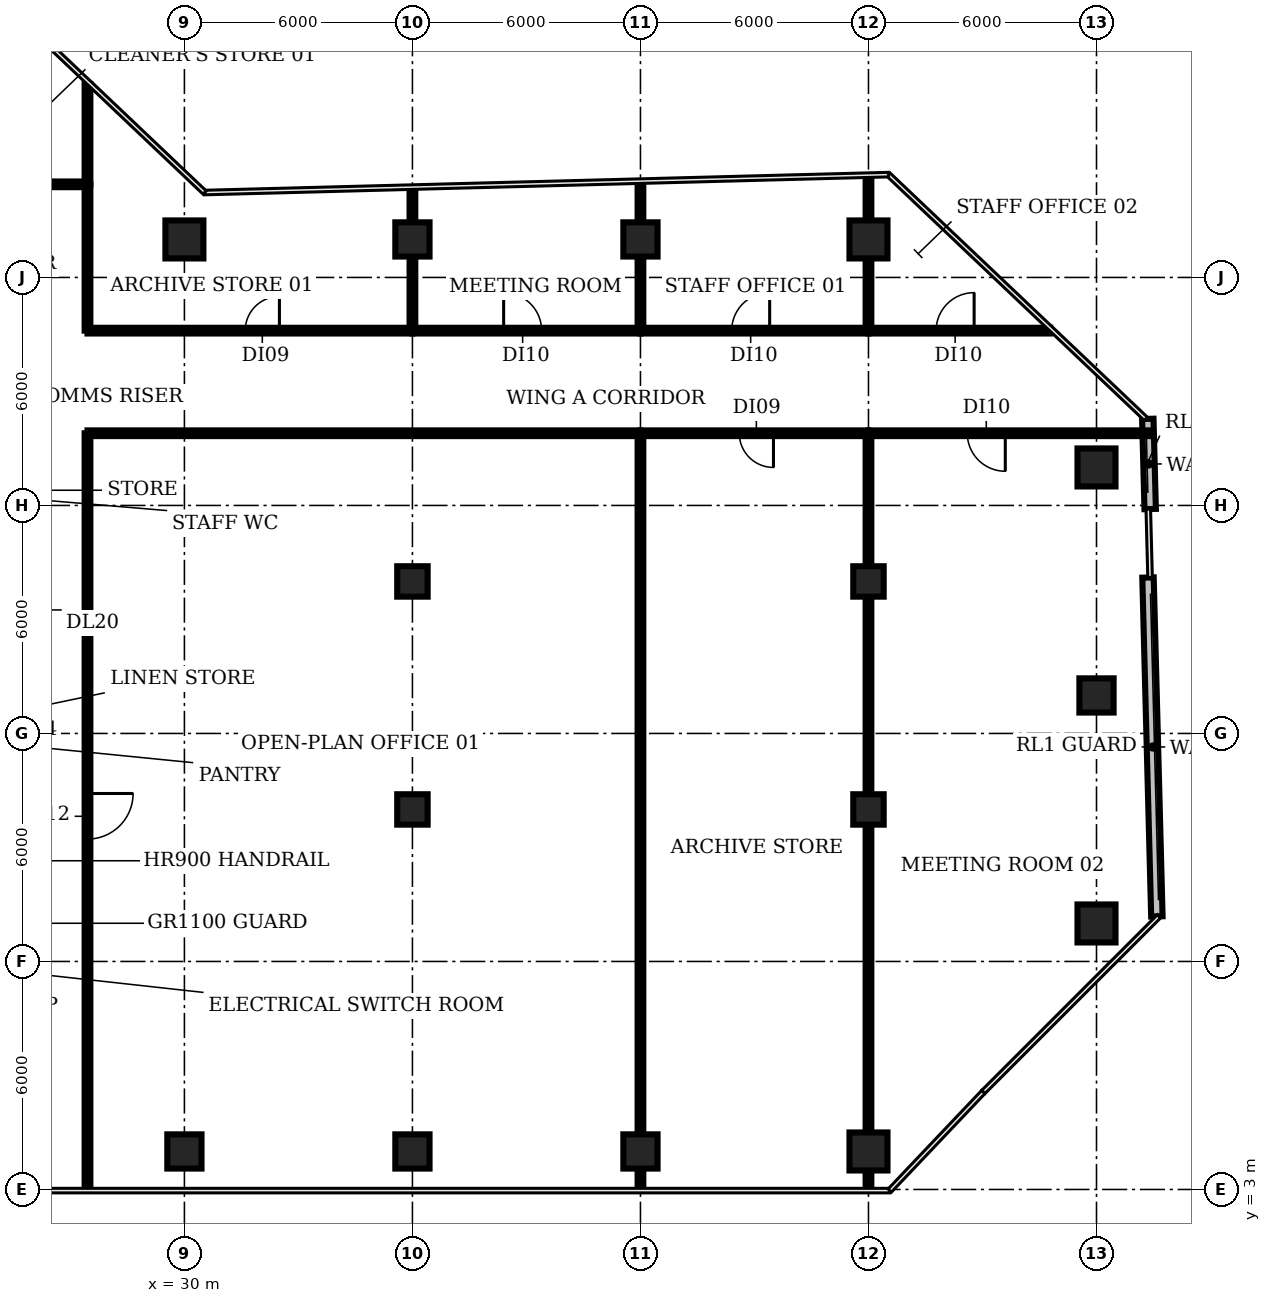
"""IFC4 building model, lengths in metres.
Left out: names, types, materials, properties, quantities, classifications, styles, units other than length and angle.
Written with IfcOpenShell. Run it as: python <this file> out.ifc"""

import sys

from ifc_helpers import new_model, si_unit, direction, frame, frame_2d, origin, origin_2d, place, context, subcontext, project, spatial, rectangle, circle, extrude, element, fill, save


model = new_model("IFC4")
c1 = context("Model", 3, precision=1e-05, world=origin(), true_north=direction((0.0, 1.0)))
c2 = subcontext(c1, "Body", "Model", "MODEL_VIEW")
j1 = project(units=[si_unit("LENGTHUNIT", "METRE"), si_unit("PLANEANGLEUNIT", "RADIAN")], contexts=[c1])
p1 = place(None, origin())
s1 = spatial("IfcSite", under=j1, at=p1, CompositionType="ELEMENT")
p2 = place(p1, origin())
s2 = spatial("IfcBuilding", under=s1, at=p2, CompositionType="ELEMENT")
p3 = place(p2, frame((0.0, 0.0, 104.6)))
s3 = spatial("IfcBuildingStorey", under=s2, at=p3, CompositionType="ELEMENT", Elevation=104.6)
p4 = place(p3, frame((30.0, 4.0, 0.0), z_axis=(0.0, 0.0, 1.0), x_axis=(1.0, 0.0, 0.0)))
e1 = element("IfcColumn", 1, at=p4, inside=s3, PredefinedType="COLUMN", context=c2, shape_type="SweptSolid", body=[
    extrude(rectangle(XDim=0.9, YDim=0.9, at=origin_2d()), origin(), (0.0, 0.0, 1.0), 3.85),
])
p5 = place(p3, frame((30.0, 28.0, 0.0), z_axis=(0.0, 0.0, 1.0), x_axis=(1.0, 0.0, 0.0)))
e2 = element("IfcColumn", 2, at=p5, inside=s3, PredefinedType="COLUMN", context=c2, shape_type="SweptSolid", body=[
    extrude(circle(Radius=0.5, at=origin_2d()), origin(), (0.0, 0.0, 1.0), 3.85),
])
p6 = place(p3, frame((36.0, 4.0, 0.0), z_axis=(0.0, 0.0, 1.0), x_axis=(1.0, 0.0, 0.0)))
e3 = element("IfcColumn", 3, at=p6, inside=s3, PredefinedType="COLUMN", context=c2, shape_type="SweptSolid", body=[
    extrude(rectangle(XDim=0.9, YDim=0.9, at=origin_2d()), origin(), (0.0, 0.0, 1.0), 3.85),
])
for number, where, z_axis, x_axis in (
    (4, (36.0, 13.0, 0.0), (0.0, 0.0, 1.0), (1.0, 0.0, 0.0)),
    (5, (36.0, 19.0, 0.0), (0.0, 0.0, 1.0), (1.0, 0.0, 0.0)),
):
    element("IfcColumn", number, at=place(p3, frame(where, z_axis=z_axis, x_axis=x_axis)), inside=s3, PredefinedType="COLUMN", context=c2, shape_type="SweptSolid", body=[
        extrude(rectangle(XDim=0.8, YDim=0.8, at=origin_2d()), origin(), (0.0, 0.0, 1.0), 3.85),
    ])
for number, where, z_axis, x_axis in (
    (6, (36.0, 28.0, 0.0), (0.0, 0.0, 1.0), (1.0, 0.0, 0.0)),
    (7, (42.0, 4.0, 0.0), (0.0, 0.0, 1.0), (1.0, 0.0, 0.0)),
    (8, (42.0, 28.0, 0.0), (0.0, 0.0, 1.0), (1.0, 0.0, 0.0)),
):
    element("IfcColumn", number, at=place(p3, frame(where, z_axis=z_axis, x_axis=x_axis)), inside=s3, PredefinedType="COLUMN", context=c2, shape_type="SweptSolid", body=[
        extrude(rectangle(XDim=0.9, YDim=0.9, at=origin_2d()), origin(), (0.0, 0.0, 1.0), 3.85),
    ])
p7 = place(p3, frame((48.0, 4.0, 0.0), z_axis=(0.0, 0.0, 1.0), x_axis=(1.0, 0.0, 0.0)))
e9 = element("IfcColumn", 9, at=p7, inside=s3, PredefinedType="COLUMN", context=c2, shape_type="SweptSolid", body=[
    extrude(circle(Radius=0.5, at=origin_2d()), origin(), (0.0, 0.0, 1.0), 3.85),
])
for number, where, z_axis, x_axis in (
    (10, (48.0, 13.0, 0.0), (0.0, 0.0, 1.0), (1.0, 0.0, 0.0)),
    (11, (48.0, 19.0, 0.0), (0.0, 0.0, 1.0), (1.0, 0.0, 0.0)),
):
    element("IfcColumn", number, at=place(p3, frame(where, z_axis=z_axis, x_axis=x_axis)), inside=s3, PredefinedType="COLUMN", context=c2, shape_type="SweptSolid", body=[
        extrude(rectangle(XDim=0.8, YDim=0.8, at=origin_2d()), origin(), (0.0, 0.0, 1.0), 3.85),
    ])
for number, where, z_axis, x_axis in (
    (12, (48.0, 28.0, 0.0), (0.0, 0.0, 1.0), (1.0, 0.0, 0.0)),
    (13, (54.0, 10.0, 0.0), (0.0, 0.0, 1.0), (1.0, 0.0, 0.0)),
):
    element("IfcColumn", number, at=place(p3, frame(where, z_axis=z_axis, x_axis=x_axis)), inside=s3, PredefinedType="COLUMN", context=c2, shape_type="SweptSolid", body=[
        extrude(circle(Radius=0.5, at=origin_2d()), origin(), (0.0, 0.0, 1.0), 3.85),
    ])
p8 = place(p3, frame((54.0, 16.0, 0.0), z_axis=(0.0, 0.0, 1.0), x_axis=(1.0, 0.0, 0.0)))
e14 = element("IfcColumn", 14, at=p8, inside=s3, PredefinedType="COLUMN", context=c2, shape_type="SweptSolid", body=[
    extrude(rectangle(XDim=0.9, YDim=0.9, at=origin_2d()), origin(), (0.0, 0.0, 1.0), 3.85),
])
p9 = place(p3, frame((54.0, 22.0, 0.0), z_axis=(0.0, 0.0, 1.0), x_axis=(1.0, 0.0, 0.0)))
e15 = element("IfcColumn", 15, at=p9, inside=s3, PredefinedType="COLUMN", context=c2, shape_type="SweptSolid", body=[
    extrude(circle(Radius=0.5, at=origin_2d()), origin(), (0.0, 0.0, 1.0), 3.85),
])
p10 = place(p3, frame((55.589, 10.185, 0.0), z_axis=(0.0, 0.0, 1.0), x_axis=(-0.026188660455, 0.999657018214, 0.0)))
e16 = element("IfcWall", 16, at=p10, inside=s3, PredefinedType="SOLIDWALL", context=c2, shape_type="SweptSolid", body=[
    extrude(rectangle(XDim=8.922, YDim=0.3, at=frame_2d((4.461, 0.0))), origin(), (0.0, 0.0, 1.0), 3.85),
])
p11 = place(p3, frame((55.412, 20.906, 0.0), z_axis=(0.0, 0.0, 1.0), x_axis=(-0.026122769601, 0.999658742226, 0.0)))
e17 = element("IfcWall", 17, at=p11, inside=s3, PredefinedType="SOLIDWALL", context=c2, shape_type="SweptSolid", body=[
    extrude(rectangle(XDim=2.374, YDim=0.3, at=frame_2d((1.187, 0.0))), origin(), (0.0, 0.0, 1.0), 3.85),
])
p12 = place(p3, frame((23.85, 29.45, 0.0), z_axis=(0.0, 0.0, 1.0), x_axis=(1.0, 0.0, 0.0)))
e18 = element("IfcWall", 18, at=p12, inside=s3, PredefinedType="PARTITIONING", context=c2, shape_type="SweptSolid", body=[
    extrude(rectangle(XDim=3.6, YDim=0.15, at=frame_2d((1.8, 0.0))), origin(), (0.0, 0.0, 1.0), 2.83),
])
p13 = place(p12, frame((1.3, 0.0, 0.0)))
e19 = element("IfcOpeningElement", 19, at=p13, cuts=e18, PredefinedType="OPENING", context=c2, shape_type="SweptSolid", body=[
    extrude(rectangle(XDim=0.9, YDim=2.1, at=frame_2d((0.45, 1.05))), frame((0.0, 0.085, 0.0), z_axis=(0.0, -1.0, 0.0), x_axis=(1.0, 0.0, 0.0)), (0.0, 0.0, 1.0), 0.17),
])
p14 = place(p3, frame((27.45, 22.9, 0.0), z_axis=(0.0, 0.0, 1.0), x_axis=(0.0, -1.0, 0.0)))
e20 = element("IfcWall", 20, at=p14, inside=s3, PredefinedType="PARTITIONING", context=c2, shape_type="SweptSolid", body=[
    extrude(rectangle(XDim=19.88, YDim=0.15, at=frame_2d((9.94, 0.0))), origin(), (0.0, 0.0, 1.0), 2.83),
])
p15 = place(p14, frame((9.48, 0.0, 0.0)))
e21 = element("IfcOpeningElement", 21, at=p15, cuts=e20, PredefinedType="OPENING", context=c2, shape_type="SweptSolid", body=[
    extrude(rectangle(XDim=1.2, YDim=2.1, at=frame_2d((0.6, 1.05))), frame((0.0, 0.085, 0.0), z_axis=(0.0, -1.0, 0.0), x_axis=(1.0, 0.0, 0.0)), (0.0, 0.0, 1.0), 0.17),
])
p16 = place(p3, frame((27.45, 22.9, 0.0), z_axis=(0.0, 0.0, 1.0), x_axis=(1.0, 0.0, 0.0)))
e22 = element("IfcWall", 22, at=p16, inside=s3, PredefinedType="PARTITIONING", context=c2, shape_type="SweptSolid", body=[
    extrude(rectangle(XDim=14.55, YDim=0.15, at=frame_2d((7.275, 0.0))), origin(), (0.0, 0.0, 1.0), 2.83),
])
p17 = place(p3, frame((27.45, 25.6, 0.0), z_axis=(0.0, 0.0, 1.0), x_axis=(0.0, 1.0, 0.0)))
e23 = element("IfcWall", 23, at=p17, inside=s3, PredefinedType="PARTITIONING", context=c2, shape_type="SweptSolid", body=[
    extrude(rectangle(XDim=3.85, YDim=0.15, at=frame_2d((1.925, 0.0))), origin(), (0.0, 0.0, 1.0), 2.83),
])
p18 = place(p3, frame((27.45, 25.6, 0.0), z_axis=(0.0, 0.0, 1.0), x_axis=(1.0, 0.0, 0.0)))
e24 = element("IfcWall", 24, at=p18, inside=s3, PredefinedType="PARTITIONING", context=c2, shape_type="SweptSolid", body=[
    extrude(rectangle(XDim=8.55, YDim=0.15, at=frame_2d((4.275, 0.0))), origin(), (0.0, 0.0, 1.0), 2.83),
])
p19 = place(p18, frame((4.15, 0.0, 0.0)))
e25 = element("IfcOpeningElement", 25, at=p19, cuts=e24, PredefinedType="OPENING", context=c2, shape_type="SweptSolid", body=[
    extrude(rectangle(XDim=0.9, YDim=2.1, at=frame_2d((0.45, 1.05))), frame((0.0, 0.085, 0.0), z_axis=(0.0, -1.0, 0.0), x_axis=(1.0, 0.0, 0.0)), (0.0, 0.0, 1.0), 0.17),
])
p20 = place(p3, frame((27.45, 29.45, 0.0), z_axis=(0.0, 0.0, 1.0), x_axis=(0.0, 1.0, 0.0)))
e26 = element("IfcWall", 26, at=p20, inside=s3, PredefinedType="PARTITIONING", context=c2, shape_type="SweptSolid", body=[
    extrude(rectangle(XDim=2.64, YDim=0.15, at=frame_2d((1.32, 0.0))), origin(), (0.0, 0.0, 1.0), 2.83),
])
p21 = place(p3, frame((36.0, 25.6, 0.0), z_axis=(0.0, 0.0, 1.0), x_axis=(0.0, 1.0, 0.0)))
e27 = element("IfcWall", 27, at=p21, inside=s3, PredefinedType="PARTITIONING", context=c2, shape_type="SweptSolid", body=[
    extrude(rectangle(XDim=3.73, YDim=0.15, at=frame_2d((1.865, 0.0))), origin(), (0.0, 0.0, 1.0), 2.83),
])
p22 = place(p3, frame((36.0, 25.6, 0.0), z_axis=(0.0, 0.0, 1.0), x_axis=(1.0, 0.0, 0.0)))
e28 = element("IfcWall", 28, at=p22, inside=s3, PredefinedType="PARTITIONING", context=c2, shape_type="SweptSolid", body=[
    extrude(rectangle(XDim=6.0, YDim=0.15, at=frame_2d((3.0, 0.0))), origin(), (0.0, 0.0, 1.0), 2.83),
])
p23 = place(p22, frame((2.4, 0.0, 0.0)))
e29 = element("IfcOpeningElement", 29, at=p23, cuts=e28, PredefinedType="OPENING", context=c2, shape_type="SweptSolid", body=[
    extrude(rectangle(XDim=1.0, YDim=2.1, at=frame_2d((0.5, 1.05))), frame((0.0, 0.085, 0.0), z_axis=(0.0, -1.0, 0.0), x_axis=(1.0, 0.0, 0.0)), (0.0, 0.0, 1.0), 0.17),
])
p24 = place(p3, frame((42.0, 3.02, 0.0), z_axis=(0.0, 0.0, 1.0), x_axis=(0.0, 1.0, 0.0)))
e30 = element("IfcWall", 30, at=p24, inside=s3, PredefinedType="PARTITIONING", context=c2, shape_type="SweptSolid", body=[
    extrude(rectangle(XDim=19.88, YDim=0.15, at=frame_2d((9.94, 0.0))), origin(), (0.0, 0.0, 1.0), 2.83),
])
p25 = place(p3, frame((42.0, 25.6, 0.0), z_axis=(0.0, 0.0, 1.0), x_axis=(0.0, 1.0, 0.0)))
e31 = element("IfcWall", 31, at=p25, inside=s3, PredefinedType="PARTITIONING", context=c2, shape_type="SweptSolid", body=[
    extrude(rectangle(XDim=3.88, YDim=0.15, at=frame_2d((1.94, 0.0))), origin(), (0.0, 0.0, 1.0), 2.83),
])
p26 = place(p3, frame((42.0, 25.6, 0.0), z_axis=(0.0, 0.0, 1.0), x_axis=(1.0, 0.0, 0.0)))
e32 = element("IfcWall", 32, at=p26, inside=s3, PredefinedType="PARTITIONING", context=c2, shape_type="SweptSolid", body=[
    extrude(rectangle(XDim=6.0, YDim=0.15, at=frame_2d((3.0, 0.0))), origin(), (0.0, 0.0, 1.0), 2.83),
])
p27 = place(p26, frame((2.4, 0.0, 0.0)))
e33 = element("IfcOpeningElement", 33, at=p27, cuts=e32, PredefinedType="OPENING", context=c2, shape_type="SweptSolid", body=[
    extrude(rectangle(XDim=1.0, YDim=2.1, at=frame_2d((0.5, 1.05))), frame((0.0, 0.085, 0.0), z_axis=(0.0, -1.0, 0.0), x_axis=(1.0, 0.0, 0.0)), (0.0, 0.0, 1.0), 0.17),
])
p28 = place(p3, frame((48.0, 3.02, 0.0), z_axis=(0.0, 0.0, 1.0), x_axis=(0.0, 1.0, 0.0)))
e34 = element("IfcWall", 34, at=p28, inside=s3, PredefinedType="PARTITIONING", context=c2, shape_type="SweptSolid", body=[
    extrude(rectangle(XDim=19.88, YDim=0.15, at=frame_2d((9.94, 0.0))), origin(), (0.0, 0.0, 1.0), 2.83),
])
p29 = place(p3, frame((48.0, 22.9, 0.0), z_axis=(0.0, 0.0, 1.0), x_axis=(-1.0, 0.0, 0.0)))
e35 = element("IfcWall", 35, at=p29, inside=s3, PredefinedType="PARTITIONING", context=c2, shape_type="SweptSolid", body=[
    extrude(rectangle(XDim=6.0, YDim=0.15, at=frame_2d((3.0, 0.0))), origin(), (0.0, 0.0, 1.0), 2.83),
])
p30 = place(p29, frame((2.5, 0.0, 0.0)))
e36 = element("IfcOpeningElement", 36, at=p30, cuts=e35, PredefinedType="OPENING", context=c2, shape_type="SweptSolid", body=[
    extrude(rectangle(XDim=0.9, YDim=2.1, at=frame_2d((0.45, 1.05))), frame((0.0, 0.085, 0.0), z_axis=(0.0, -1.0, 0.0), x_axis=(1.0, 0.0, 0.0)), (0.0, 0.0, 1.0), 0.17),
])
p31 = place(p3, frame((48.0, 25.6, 0.0), z_axis=(0.0, 0.0, 1.0), x_axis=(0.0, 1.0, 0.0)))
e37 = element("IfcWall", 37, at=p31, inside=s3, PredefinedType="PARTITIONING", context=c2, shape_type="SweptSolid", body=[
    extrude(rectangle(XDim=4.04, YDim=0.15, at=frame_2d((2.02, 0.0))), origin(), (0.0, 0.0, 1.0), 2.83),
])
p32 = place(p3, frame((48.0, 25.6, 0.0), z_axis=(0.0, 0.0, 1.0), x_axis=(1.0, 0.0, 0.0)))
e38 = element("IfcWall", 38, at=p32, inside=s3, PredefinedType="PARTITIONING", context=c2, shape_type="SweptSolid", body=[
    extrude(rectangle(XDim=4.78, YDim=0.15, at=frame_2d((2.39, 0.0))), origin(), (0.0, 0.0, 1.0), 2.83),
])
p33 = place(p32, frame((1.78, 0.0, 0.0)))
e39 = element("IfcOpeningElement", 39, at=p33, cuts=e38, PredefinedType="OPENING", context=c2, shape_type="SweptSolid", body=[
    extrude(rectangle(XDim=1.0, YDim=2.1, at=frame_2d((0.5, 1.05))), frame((0.0, 0.085, 0.0), z_axis=(0.0, -1.0, 0.0), x_axis=(1.0, 0.0, 0.0)), (0.0, 0.0, 1.0), 0.17),
])
p34 = place(p3, frame((55.37, 22.9, 0.0), z_axis=(0.0, 0.0, 1.0), x_axis=(-1.0, 0.0, 0.0)))
e40 = element("IfcWall", 40, at=p34, inside=s3, PredefinedType="PARTITIONING", context=c2, shape_type="SweptSolid", body=[
    extrude(rectangle(XDim=7.37, YDim=0.15, at=frame_2d((3.685, 0.0))), origin(), (0.0, 0.0, 1.0), 2.83),
])
p35 = place(p34, frame((3.77, 0.0, 0.0)))
e41 = element("IfcOpeningElement", 41, at=p35, cuts=e40, PredefinedType="OPENING", context=c2, shape_type="SweptSolid", body=[
    extrude(rectangle(XDim=1.0, YDim=2.1, at=frame_2d((0.5, 1.05))), frame((0.0, 0.085, 0.0), z_axis=(0.0, -1.0, 0.0), x_axis=(1.0, 0.0, 0.0)), (0.0, 0.0, 1.0), 0.17),
])
p36 = place(p15, origin())
e42 = element("IfcDoor", 42, at=p36, inside=s3, OperationType="SINGLE_SWING_LEFT", PredefinedType="DOOR", context=c2, shape_type="SweptSolid", body=[
    extrude(rectangle(XDim=1.2, YDim=2.1, at=frame_2d((0.6, 1.05))), frame((0.0, 0.025, 0.0), z_axis=(0.0, -1.0, 0.0), x_axis=(1.0, 0.0, 0.0)), (0.0, 0.0, 1.0), 0.05),
])
fill(e21, e42)
p37 = place(p19, origin())
e43 = element("IfcDoor", 43, at=p37, inside=s3, OperationType="SINGLE_SWING_RIGHT", PredefinedType="DOOR", context=c2, shape_type="SweptSolid", body=[
    extrude(rectangle(XDim=0.9, YDim=2.1, at=frame_2d((0.45, 1.05))), frame((0.0, 0.025, 0.0), z_axis=(0.0, -1.0, 0.0), x_axis=(1.0, 0.0, 0.0)), (0.0, 0.0, 1.0), 0.05),
])
fill(e25, e43)
p38 = place(p23, origin())
e44 = element("IfcDoor", 44, at=p38, inside=s3, OperationType="SINGLE_SWING_LEFT", PredefinedType="DOOR", context=c2, shape_type="SweptSolid", body=[
    extrude(rectangle(XDim=1.0, YDim=2.1, at=frame_2d((0.5, 1.05))), frame((0.0, 0.025, 0.0), z_axis=(0.0, -1.0, 0.0), x_axis=(1.0, 0.0, 0.0)), (0.0, 0.0, 1.0), 0.05),
])
fill(e29, e44)
p39 = place(p27, origin())
e45 = element("IfcDoor", 45, at=p39, inside=s3, OperationType="SINGLE_SWING_RIGHT", PredefinedType="DOOR", context=c2, shape_type="SweptSolid", body=[
    extrude(rectangle(XDim=1.0, YDim=2.1, at=frame_2d((0.5, 1.05))), frame((0.0, 0.025, 0.0), z_axis=(0.0, -1.0, 0.0), x_axis=(1.0, 0.0, 0.0)), (0.0, 0.0, 1.0), 0.05),
])
fill(e33, e45)
p40 = place(p30, origin())
e46 = element("IfcDoor", 46, at=p40, inside=s3, OperationType="SINGLE_SWING_LEFT", PredefinedType="DOOR", context=c2, shape_type="SweptSolid", body=[
    extrude(rectangle(XDim=0.9, YDim=2.1, at=frame_2d((0.45, 1.05))), frame((0.0, 0.025, 0.0), z_axis=(0.0, -1.0, 0.0), x_axis=(1.0, 0.0, 0.0)), (0.0, 0.0, 1.0), 0.05),
])
fill(e36, e46)
p41 = place(p33, origin())
e47 = element("IfcDoor", 47, at=p41, inside=s3, OperationType="SINGLE_SWING_RIGHT", PredefinedType="DOOR", context=c2, shape_type="SweptSolid", body=[
    extrude(rectangle(XDim=1.0, YDim=2.1, at=frame_2d((0.5, 1.05))), frame((0.0, 0.025, 0.0), z_axis=(0.0, -1.0, 0.0), x_axis=(1.0, 0.0, 0.0)), (0.0, 0.0, 1.0), 0.05),
])
fill(e39, e47)
p42 = place(p35, origin())
e48 = element("IfcDoor", 48, at=p42, inside=s3, OperationType="SINGLE_SWING_LEFT", PredefinedType="DOOR", context=c2, shape_type="SweptSolid", body=[
    extrude(rectangle(XDim=1.0, YDim=2.1, at=frame_2d((0.5, 1.05))), frame((0.0, 0.025, 0.0), z_axis=(0.0, -1.0, 0.0), x_axis=(1.0, 0.0, 0.0)), (0.0, 0.0, 1.0), 0.05),
])
fill(e41, e48)
save(model, sys.argv[1])
